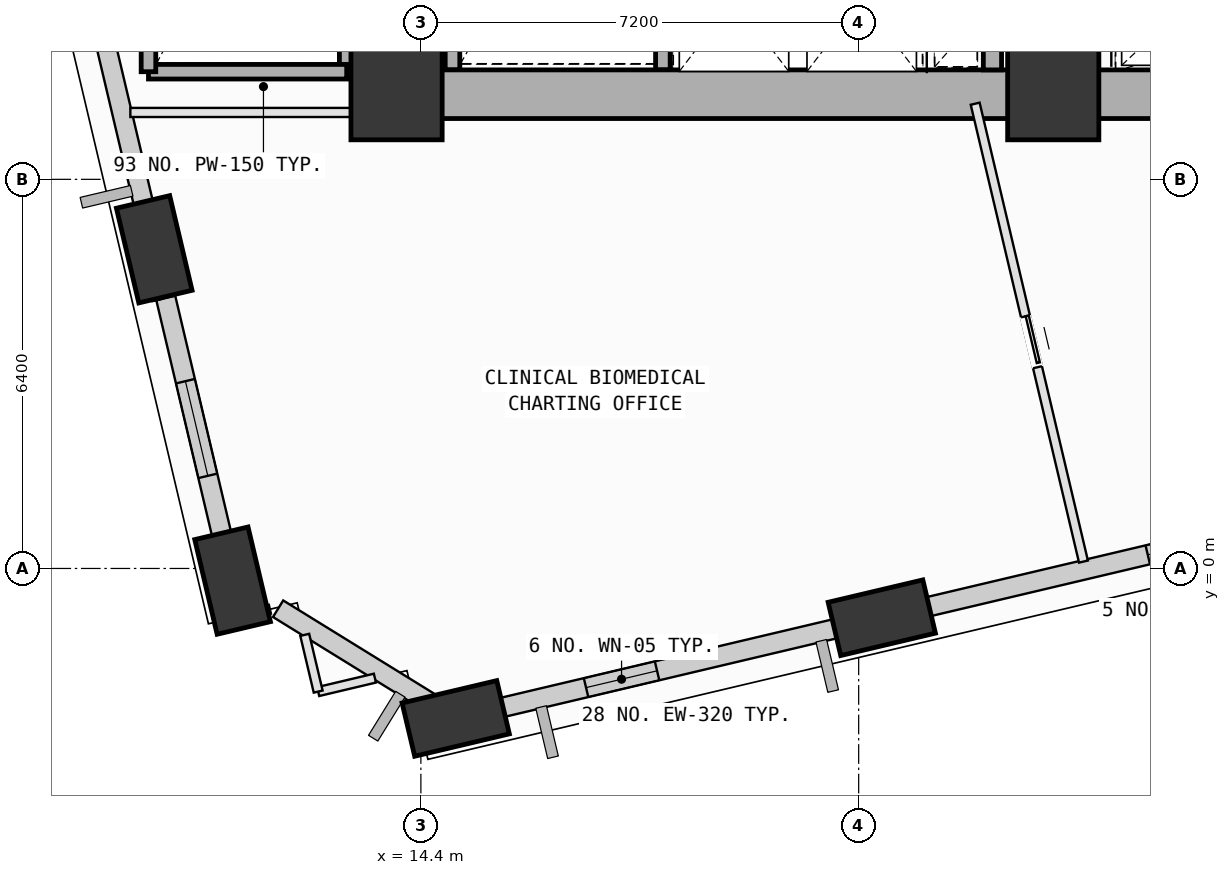
"""IFC4 building model, lengths in metres.
Left out: names, types, materials, properties, quantities, classifications, styles, units other than length and angle.
Written with IfcOpenShell. Run it as: python <this file> out.ifc"""

import sys

from ifc_helpers import new_model, si_unit, direction, frame, frame_2d, origin, origin_2d, place, context, subcontext, project, spatial, rectangle, extrude, element, fill, save


model = new_model("IFC4")
c1 = context("Model", 3, precision=1e-05, world=origin(), true_north=direction((0.0, 1.0)))
c2 = subcontext(c1, "Body", "Model", "MODEL_VIEW")
j1 = project(units=[si_unit("LENGTHUNIT", "METRE"), si_unit("PLANEANGLEUNIT", "RADIAN")], contexts=[c1])
p1 = place(None, origin())
s1 = spatial("IfcSite", under=j1, at=p1, CompositionType="ELEMENT")
p2 = place(p1, origin())
s2 = spatial("IfcBuilding", under=s1, at=p2, CompositionType="ELEMENT")
p3 = place(p2, frame((0.0, 0.0, 79.0)))
s3 = spatial("IfcBuildingStorey", under=s2, at=p3, CompositionType="ELEMENT", Elevation=79.0)
for number, where, z_axis, x_axis in (
    (1, (14.0, 7.8, 0.0), (0.0, 0.0, 1.0), (1.0, 0.0, 0.0)),
    (2, (24.8, 7.8, 0.0), (0.0, 0.0, 1.0), (1.0, 0.0, 0.0)),
):
    element("IfcColumn", number, at=place(p3, frame(where, z_axis=z_axis, x_axis=x_axis)), inside=s3, PredefinedType="COLUMN", context=c2, shape_type="SweptSolid", body=[
        extrude(rectangle(XDim=1.5, YDim=1.5, at=origin_2d()), origin(), (0.0, 0.0, 1.0), 4.0),
    ])
p4 = place(p3, frame((14.973, -2.467, 0.002), z_axis=(0.11261318485, -0.075570187747, 0.990761029372), x_axis=(0.353017915617, 0.935096231828, 0.031199174268)))
e3 = element("IfcColumn", 3, at=p4, inside=s3, PredefinedType="COLUMN", context=c2, shape_type="SweptSolid", body=[
    extrude(rectangle(XDim=1.6, YDim=0.9, at=origin_2d()), origin(), (0.0, 0.0, 1.0), 3.948),
])
p5 = place(p3, frame((21.98, -0.81, 0.002), z_axis=(0.105804523447, -0.046969297792, 0.993277044879), x_axis=(0.186010672696, 0.982186756856, 0.026630889967)))
e4 = element("IfcColumn", 4, at=p5, inside=s3, PredefinedType="COLUMN", context=c2, shape_type="SweptSolid", body=[
    extrude(rectangle(XDim=1.6, YDim=0.9, at=origin_2d()), origin(), (0.0, 0.0, 1.0), 3.95),
])
p6 = place(p3, frame((10.015, 5.25, 0.002), z_axis=(0.081173273007, -0.0963231235, 0.992034654449), x_axis=(-0.798045426848, 0.589996603897, 0.122586720637)))
e5 = element("IfcColumn", 5, at=p6, inside=s3, PredefinedType="COLUMN", context=c2, shape_type="SweptSolid", body=[
    extrude(rectangle(XDim=1.6, YDim=0.9, at=origin_2d()), origin(), (0.0, 0.0, 1.0), 3.916),
])
p7 = place(p3, frame((11.303, -0.2, 0.002), z_axis=(0.103356682882, -0.090686751345, 0.990501544287), x_axis=(-0.876292372031, 0.462823491744, 0.133813654794)))
e6 = element("IfcColumn", 6, at=p7, inside=s3, PredefinedType="COLUMN", context=c2, shape_type="SweptSolid", body=[
    extrude(rectangle(XDim=1.6, YDim=0.9, at=origin_2d()), origin(), (0.0, 0.0, 1.0), 3.912),
])
p8 = place(p3, frame((21.585, -0.903, 0.0), z_axis=(0.0, 0.0, 1.0), x_axis=(-0.973180001823, -0.230044960936, 0.0)))
e7 = element("IfcWall", 7, at=p8, inside=s3, PredefinedType="SOLIDWALL", context=c2, shape_type="SweptSolid", body=[
    extrude(rectangle(XDim=6.034, YDim=0.32, at=frame_2d((3.017, 0.0))), origin(), (0.0, 0.0, 1.0), 3.085),
])
p9 = place(p8, frame((3.392, 0.0, 0.75)))
e8 = element("IfcOpeningElement", 8, at=p9, cuts=e7, PredefinedType="OPENING", context=c2, shape_type="SweptSolid", body=[
    extrude(rectangle(XDim=1.2, YDim=1.75, at=frame_2d((0.6, 0.875))), frame((0.0, 0.17, 0.0), z_axis=(0.0, -1.0, 0.0), x_axis=(1.0, 0.0, 0.0)), (0.0, 0.0, 1.0), 0.34),
])
p10 = place(p3, frame((28.581, 0.75, 0.0), z_axis=(0.0, 0.0, 1.0), x_axis=(-0.973180476265, -0.230042953851, 0.0)))
e9 = element("IfcWall", 9, at=p10, inside=s3, PredefinedType="SOLIDWALL", context=c2, shape_type="SweptSolid", body=[
    extrude(rectangle(XDim=6.006, YDim=0.32, at=frame_2d((3.003, 0.0))), origin(), (0.0, 0.0, 1.0), 3.085),
])
p11 = place(p10, frame((0.688, 0.0, 0.75)))
e10 = element("IfcOpeningElement", 10, at=p11, cuts=e9, PredefinedType="OPENING", context=c2, shape_type="SweptSolid", body=[
    extrude(rectangle(XDim=1.6, YDim=1.95, at=frame_2d((0.8, 0.975))), frame((0.0, 0.17, 0.0), z_axis=(0.0, -1.0, 0.0), x_axis=(1.0, 0.0, 0.0)), (0.0, 0.0, 1.0), 0.34),
])
p12 = place(p3, frame((9.93, 5.61, 0.0), z_axis=(0.0, 0.0, 1.0), x_axis=(-0.230053494691, 0.973177984533, 0.0)))
e11 = element("IfcWall", 11, at=p12, inside=s3, PredefinedType="SOLIDWALL", context=c2, shape_type="SweptSolid", body=[
    extrude(rectangle(XDim=5.997, YDim=0.32, at=frame_2d((2.999, 0.0))), origin(), (0.0, 0.0, 1.0), 3.085),
])
p13 = place(p12, frame((3.096, 0.0, 0.75)))
e12 = element("IfcOpeningElement", 12, at=p13, cuts=e11, PredefinedType="OPENING", context=c2, shape_type="SweptSolid", body=[
    extrude(rectangle(XDim=1.2, YDim=1.75, at=frame_2d((0.6, 0.875))), frame((0.0, 0.17, 0.0), z_axis=(0.0, -1.0, 0.0), x_axis=(1.0, 0.0, 0.0)), (0.0, 0.0, 1.0), 0.34),
])
p14 = place(p3, frame((11.22, 0.15, 0.0), z_axis=(0.0, 0.0, 1.0), x_axis=(-0.230068288332, 0.973174487286, 0.0)))
e13 = element("IfcWall", 13, at=p14, inside=s3, PredefinedType="SOLIDWALL", context=c2, shape_type="SweptSolid", body=[
    extrude(rectangle(XDim=4.417, YDim=0.32, at=frame_2d((2.208, 0.0))), origin(), (0.0, 0.0, 1.0), 3.085),
])
p15 = place(p14, frame((1.411, 0.0, 0.75)))
e14 = element("IfcOpeningElement", 14, at=p15, cuts=e13, PredefinedType="OPENING", context=c2, shape_type="SweptSolid", body=[
    extrude(rectangle(XDim=1.6, YDim=1.95, at=frame_2d((0.8, 0.975))), frame((0.0, 0.17, 0.0), z_axis=(0.0, -1.0, 0.0), x_axis=(1.0, 0.0, 0.0)), (0.0, 0.0, 1.0), 0.34),
])
p16 = place(p3, frame((14.689, -2.291, 0.0), z_axis=(0.0, 0.0, 1.0), x_axis=(-0.850818715167, 0.525459336126, 0.0)))
e15 = element("IfcWall", 15, at=p16, inside=s3, PredefinedType="SOLIDWALL", context=c2, shape_type="SweptSolid", body=[
    extrude(rectangle(XDim=3.099, YDim=0.32, at=frame_2d((1.55, 0.0))), origin(), (0.0, 0.0, 1.0), 3.085),
])
for number, where, z_axis, x_axis in (
    (16, (18.38, 15.12, 0.0), (0.0, 0.0, 1.0), (0.0, -1.0, 0.0)),
    (17, (14.92, 8.2, 0.0), (0.0, 0.0, 1.0), (0.0, 1.0, 0.0)),
):
    element("IfcWall", number, at=place(p3, frame(where, z_axis=z_axis, x_axis=x_axis)), inside=s3, PredefinedType="SOLIDWALL", context=c2, shape_type="SweptSolid", body=[
        extrude(rectangle(XDim=6.92, YDim=0.24, at=frame_2d((3.46, 0.0))), origin(), (0.0, 0.0, 1.0), 3.7),
    ])
p17 = place(p3, frame((13.18, 15.22, 0.0), z_axis=(0.0, 0.0, 1.0), x_axis=(0.0, -1.0, 0.0)))
e18 = element("IfcWall", 18, at=p17, inside=s3, PredefinedType="SOLIDWALL", context=c2, shape_type="SweptSolid", body=[
    extrude(rectangle(XDim=7.05, YDim=0.24, at=frame_2d((3.525, 0.0))), origin(), (0.0, 0.0, 1.0), 3.7),
])
p18 = place(p3, frame((13.18, 8.17, 0.0), z_axis=(0.0, 0.0, 1.0), x_axis=(-1.0, 0.0, 0.0)))
e19 = element("IfcWall", 19, at=p18, inside=s3, PredefinedType="SOLIDWALL", context=c2, shape_type="SweptSolid", body=[
    extrude(rectangle(XDim=3.26, YDim=0.24, at=frame_2d((1.63, 0.0))), origin(), (0.0, 0.0, 1.0), 3.7),
])
p19 = place(p3, frame((9.92, 8.17, 0.0), z_axis=(0.0, 0.0, 1.0), x_axis=(0.0, 1.0, 0.0)))
e20 = element("IfcWall", 20, at=p19, inside=s3, PredefinedType="SOLIDWALL", context=c2, shape_type="SweptSolid", body=[
    extrude(rectangle(XDim=7.05, YDim=0.24, at=frame_2d((3.525, 0.0))), origin(), (0.0, 0.0, 1.0), 3.7),
])
for number, where, z_axis, x_axis in (
    (21, (14.0, 7.8, 0.0), (0.0, 0.0, 1.0), (1.0, 0.0, 0.0)),
    (22, (24.8, 7.8, 0.0), (0.0, 0.0, 1.0), (1.0, 0.0, 0.0)),
):
    element("IfcWall", number, at=place(p3, frame(where, z_axis=z_axis, x_axis=x_axis)), inside=s3, PredefinedType="SHEAR", context=c2, shape_type="SweptSolid", body=[
        extrude(rectangle(XDim=10.8, YDim=0.8, at=frame_2d((5.4, 0.0))), origin(), (0.0, 0.0, 1.0), 3.7),
    ])
p20 = place(p3, frame((14.0, 16.8, 0.0), z_axis=(0.0, 0.0, 1.0), x_axis=(0.0, -1.0, 0.0)))
e23 = element("IfcWall", 23, at=p20, inside=s3, PredefinedType="SHEAR", context=c2, shape_type="SweptSolid", body=[
    extrude(rectangle(XDim=9.0, YDim=0.8, at=frame_2d((4.5, 0.0))), origin(), (0.0, 0.0, 1.0), 3.7),
])
p21 = place(p3, frame((23.8, 8.2, 0.0), z_axis=(0.0, 0.0, 1.0), x_axis=(0.0, 1.0, 0.0)))
e24 = element("IfcWall", 24, at=p21, inside=s3, PredefinedType="SOLIDWALL", context=c2, shape_type="SweptSolid", body=[
    extrude(rectangle(XDim=2.48, YDim=0.3, at=frame_2d((1.24, 0.0))), origin(), (0.0, 0.0, 1.0), 3.7),
])
p22 = place(p3, frame((9.622, 7.5, 0.0), z_axis=(0.0, 0.0, 1.0), x_axis=(1.0, 0.0, 0.0)))
e25 = element("IfcWall", 25, at=p22, inside=s3, PredefinedType="PARTITIONING", context=c2, shape_type="SweptSolid", body=[
    extrude(rectangle(XDim=4.378, YDim=0.15, at=frame_2d((2.189, 0.0))), origin(), (0.0, 0.0, 1.0), 3.7),
])
p23 = place(p3, frame((15.765, -2.515, 0.0), z_axis=(0.0, 0.0, 1.0), x_axis=(-0.97313854594, -0.230220264974, 0.0)))
e26 = element("IfcWall", 26, at=p23, inside=s3, PredefinedType="PARTITIONING", context=c2, shape_type="SweptSolid", body=[
    extrude(rectangle(XDim=1.36, YDim=0.15, at=frame_2d((0.68, 0.0))), origin(), (0.0, 0.0, 1.0), 3.085),
])
p24 = place(p3, frame((14.442, -2.828, 0.0), z_axis=(0.0, 0.0, 1.0), x_axis=(-0.230018874395, 0.973186167915, 0.0)))
e27 = element("IfcWall", 27, at=p24, inside=s3, PredefinedType="PARTITIONING", context=c2, shape_type="SweptSolid", body=[
    extrude(rectangle(XDim=0.639, YDim=0.15, at=frame_2d((0.319, 0.0))), origin(), (0.0, 0.0, 1.0), 3.7),
])
p25 = place(p3, frame((13.644, -1.804, 0.0), z_axis=(0.0, 0.0, 1.0), x_axis=(-0.973092306763, -0.230415629937, 0.0)))
e28 = element("IfcWall", 28, at=p25, inside=s3, PredefinedType="PARTITIONING", context=c2, shape_type="SweptSolid", body=[
    extrude(rectangle(XDim=0.959, YDim=0.15, at=frame_2d((0.479, 0.0))), origin(), (0.0, 0.0, 1.0), 3.7),
])
p26 = place(p3, frame((12.711, -2.025, 0.0), z_axis=(0.0, 0.0, 1.0), x_axis=(-0.23047272965, 0.973078784522, 0.0)))
e29 = element("IfcWall", 29, at=p26, inside=s3, PredefinedType="PARTITIONING", context=c2, shape_type="SweptSolid", body=[
    extrude(rectangle(XDim=0.959, YDim=0.15, at=frame_2d((0.479, 0.0))), origin(), (0.0, 0.0, 1.0), 3.7),
])
p27 = place(p3, frame((11.917, -0.671, 0.0), z_axis=(0.0, 0.0, 1.0), x_axis=(-0.973120843114, -0.230295081789, 0.0)))
e30 = element("IfcWall", 30, at=p27, inside=s3, PredefinedType="PARTITIONING", context=c2, shape_type="SweptSolid", body=[
    extrude(rectangle(XDim=0.639, YDim=0.15, at=frame_2d((0.32, 0.0))), origin(), (0.0, 0.0, 1.0), 3.7),
])
p28 = place(p3, frame((11.295, -0.818, 0.0), z_axis=(0.0, 0.0, 1.0), x_axis=(-0.230187505827, 0.973146295354, 0.0)))
e31 = element("IfcWall", 31, at=p28, inside=s3, PredefinedType="PARTITIONING", context=c2, shape_type="SweptSolid", body=[
    extrude(rectangle(XDim=0.96, YDim=0.15, at=frame_2d((0.48, 0.0))), origin(), (0.0, 0.0, 1.0), 3.7),
])
p29 = place(p3, frame((10.058, 4.414, 0.0), z_axis=(0.0, 0.0, 1.0), x_axis=(-0.229666230809, 0.973269450063, 0.0)))
e32 = element("IfcWall", 32, at=p29, inside=s3, PredefinedType="PARTITIONING", context=c2, shape_type="SweptSolid", body=[
    extrude(rectangle(XDim=1.194, YDim=0.15, at=frame_2d((0.597, 0.0))), origin(), (0.0, 0.0, 1.0), 3.085),
])
p30 = place(p3, frame((22.789, -0.855, 0.0), z_axis=(0.0, 0.0, 1.0), x_axis=(-0.973205611237, -0.229936596165, 0.0)))
e33 = element("IfcWall", 33, at=p30, inside=s3, PredefinedType="PARTITIONING", context=c2, shape_type="SweptSolid", body=[
    extrude(rectangle(XDim=1.183, YDim=0.15, at=frame_2d((0.591, 0.0))), origin(), (0.0, 0.0, 1.0), 3.085),
])
p31 = place(p3, frame((23.516, 7.644, 0.0), z_axis=(0.0, 0.0, 1.0), x_axis=(0.230141707273, -0.973157127382, 0.0)))
e34 = element("IfcWall", 34, at=p31, inside=s3, PredefinedType="PARTITIONING", context=c2, shape_type="SweptSolid", body=[
    extrude(rectangle(XDim=7.739, YDim=0.15, at=frame_2d((3.869, 0.0))), origin(), (0.0, 0.0, 1.0), 3.7),
])
p32 = place(p31, frame((3.594, 0.0, 0.0)))
e35 = element("IfcOpeningElement", 35, at=p32, cuts=e34, PredefinedType="OPENING", context=c2, shape_type="SweptSolid", body=[
    extrude(rectangle(XDim=0.86, YDim=2.06, at=frame_2d((0.43, 1.03))), frame((0.0, 0.085, 0.0), z_axis=(0.0, -1.0, 0.0), x_axis=(1.0, 0.0, 0.0)), (0.0, 0.0, 1.0), 0.17),
])
p33 = place(p9, origin())
e36 = element("IfcWindow", 36, at=p33, inside=s3, PartitioningType="SINGLE_PANEL", PredefinedType="WINDOW", context=c2, shape_type="SweptSolid", body=[
    extrude(rectangle(XDim=1.2, YDim=1.75, at=frame_2d((0.6, 0.875))), frame((0.0, 0.03, 0.0), z_axis=(0.0, -1.0, 0.0), x_axis=(1.0, 0.0, 0.0)), (0.0, 0.0, 1.0), 0.06),
])
fill(e8, e36)
p34 = place(p11, origin())
e37 = element("IfcWindow", 37, at=p34, inside=s3, PartitioningType="SINGLE_PANEL", PredefinedType="WINDOW", context=c2, shape_type="SweptSolid", body=[
    extrude(rectangle(XDim=1.6, YDim=1.95, at=frame_2d((0.8, 0.975))), frame((0.0, 0.03, 0.0), z_axis=(0.0, -1.0, 0.0), x_axis=(1.0, 0.0, 0.0)), (0.0, 0.0, 1.0), 0.06),
])
fill(e10, e37)
p35 = place(p15, origin())
e38 = element("IfcWindow", 38, at=p35, inside=s3, PartitioningType="SINGLE_PANEL", PredefinedType="WINDOW", context=c2, shape_type="SweptSolid", body=[
    extrude(rectangle(XDim=1.6, YDim=1.95, at=frame_2d((0.8, 0.975))), frame((0.0, 0.03, 0.0), z_axis=(0.0, -1.0, 0.0), x_axis=(1.0, 0.0, 0.0)), (0.0, 0.0, 1.0), 0.06),
])
fill(e14, e38)
p36 = place(p32, origin())
e39 = element("IfcDoor", 39, at=p36, inside=s3, OperationType="SLIDING_TO_LEFT", PredefinedType="DOOR", context=c2, shape_type="SweptSolid", body=[
    extrude(rectangle(XDim=0.86, YDim=2.06, at=frame_2d((0.43, 1.03))), frame((0.0, 0.025, 0.0), z_axis=(0.0, -1.0, 0.0), x_axis=(1.0, 0.0, 0.0)), (0.0, 0.0, 1.0), 0.05),
])
fill(e35, e39)
save(model, sys.argv[1])
